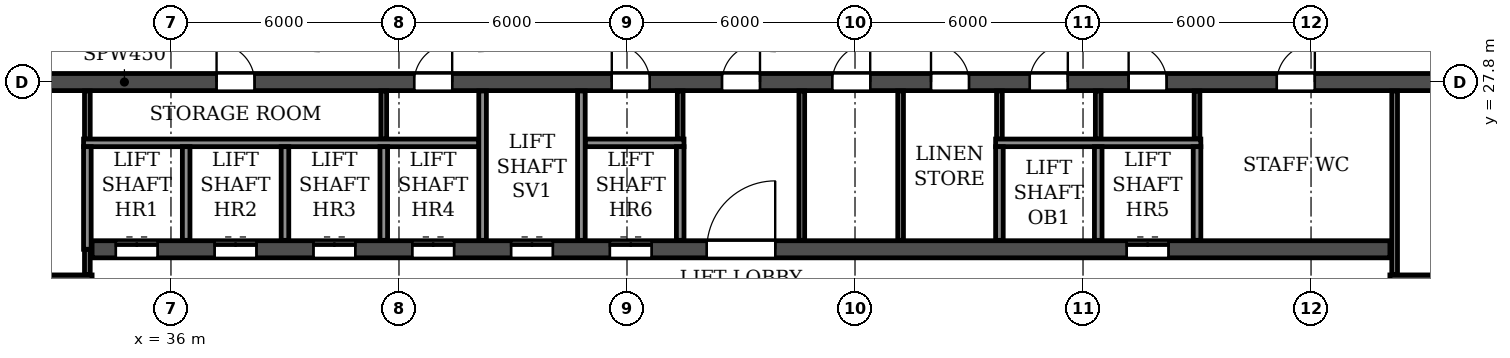
"""IFC4 building model, lengths in metres.
Left out: names, types, materials, properties, quantities, classifications, styles, units other than length and angle.
Written with IfcOpenShell. Run it as: python <this file> out.ifc"""

import sys

from ifc_helpers import new_model, si_unit, direction, frame, frame_2d, origin, place, context, subcontext, project, spatial, rectangle, extrude, element, fill, save


model = new_model("IFC4")
c1 = context("Model", 3, precision=1e-05, world=origin(), true_north=direction((0.0, 1.0)))
c2 = subcontext(c1, "Body", "Model", "MODEL_VIEW")
j1 = project(units=[si_unit("LENGTHUNIT", "METRE"), si_unit("PLANEANGLEUNIT", "RADIAN")], contexts=[c1])
p1 = place(None, origin())
s1 = spatial("IfcSite", under=j1, at=p1, CompositionType="ELEMENT")
p2 = place(p1, origin())
s2 = spatial("IfcBuilding", under=s1, at=p2, CompositionType="ELEMENT")
p3 = place(p2, frame((0.0, 0.0, 158.7)))
s3 = spatial("IfcBuildingStorey", under=s2, at=p3, CompositionType="ELEMENT", Elevation=158.7)
p4 = place(p3, frame((18.2, 27.8, 0.0), z_axis=(0.0, 0.0, 1.0), x_axis=(1.0, 0.0, 0.0)))
e1 = element("IfcWall", 1, at=p4, inside=s3, PredefinedType="SOLIDWALL", context=c2, shape_type="SweptSolid", body=[
    extrude(rectangle(XDim=65.6, YDim=0.45, at=frame_2d((32.8, 0.0))), origin(), (0.0, 0.0, 1.0), 3.07),
])
p5 = place(p4, frame((0.7, 0.0, 0.0)))
e2 = element("IfcOpeningElement", 2, at=p5, cuts=e1, PredefinedType="OPENING", context=c2, shape_type="SweptSolid", body=[
    extrude(rectangle(XDim=1.0, YDim=2.1, at=frame_2d((0.5, 1.05))), frame((0.0, 0.235, 0.0), z_axis=(0.0, -1.0, 0.0), x_axis=(1.0, 0.0, 0.0)), (0.0, 0.0, 1.0), 0.47),
])
p6 = place(p4, frame((4.05, 0.0, 0.0)))
e3 = element("IfcOpeningElement", 3, at=p6, cuts=e1, PredefinedType="OPENING", context=c2, shape_type="SweptSolid", body=[
    extrude(rectangle(XDim=0.9, YDim=2.1, at=frame_2d((0.45, 1.05))), frame((0.0, 0.235, 0.0), z_axis=(0.0, -1.0, 0.0), x_axis=(1.0, 0.0, 0.0)), (0.0, 0.0, 1.0), 0.47),
])
p7 = place(p4, frame((8.65, 0.0, 0.0)))
e4 = element("IfcOpeningElement", 4, at=p7, cuts=e1, PredefinedType="OPENING", context=c2, shape_type="SweptSolid", body=[
    extrude(rectangle(XDim=0.9, YDim=2.1, at=frame_2d((0.45, 1.05))), frame((0.0, 0.235, 0.0), z_axis=(0.0, -1.0, 0.0), x_axis=(1.0, 0.0, 0.0)), (0.0, 0.0, 1.0), 0.47),
])
p8 = place(p4, frame((13.25, 0.0, 0.0)))
e5 = element("IfcOpeningElement", 5, at=p8, cuts=e1, PredefinedType="OPENING", context=c2, shape_type="SweptSolid", body=[
    extrude(rectangle(XDim=0.9, YDim=2.1, at=frame_2d((0.45, 1.05))), frame((0.0, 0.235, 0.0), z_axis=(0.0, -1.0, 0.0), x_axis=(1.0, 0.0, 0.0)), (0.0, 0.0, 1.0), 0.47),
])
p9 = place(p4, frame((19.0, 0.0, 0.0)))
e6 = element("IfcOpeningElement", 6, at=p9, cuts=e1, PredefinedType="OPENING", context=c2, shape_type="SweptSolid", body=[
    extrude(rectangle(XDim=1.0, YDim=2.1, at=frame_2d((0.5, 1.05))), frame((0.0, 0.235, 0.0), z_axis=(0.0, -1.0, 0.0), x_axis=(1.0, 0.0, 0.0)), (0.0, 0.0, 1.0), 0.47),
])
p10 = place(p4, frame((24.2, 0.0, 0.0)))
e7 = element("IfcOpeningElement", 7, at=p10, cuts=e1, PredefinedType="OPENING", context=c2, shape_type="SweptSolid", body=[
    extrude(rectangle(XDim=1.0, YDim=2.1, at=frame_2d((0.5, 1.05))), frame((0.0, 0.235, 0.0), z_axis=(0.0, -1.0, 0.0), x_axis=(1.0, 0.0, 0.0)), (0.0, 0.0, 1.0), 0.47),
])
p11 = place(p4, frame((29.4, 0.0, 0.0)))
e8 = element("IfcOpeningElement", 8, at=p11, cuts=e1, PredefinedType="OPENING", context=c2, shape_type="SweptSolid", body=[
    extrude(rectangle(XDim=1.0, YDim=2.1, at=frame_2d((0.5, 1.05))), frame((0.0, 0.235, 0.0), z_axis=(0.0, -1.0, 0.0), x_axis=(1.0, 0.0, 0.0)), (0.0, 0.0, 1.0), 0.47),
])
p12 = place(p4, frame((32.3, 0.0, 0.0)))
e9 = element("IfcOpeningElement", 9, at=p12, cuts=e1, PredefinedType="OPENING", context=c2, shape_type="SweptSolid", body=[
    extrude(rectangle(XDim=1.0, YDim=2.1, at=frame_2d((0.5, 1.05))), frame((0.0, 0.235, 0.0), z_axis=(0.0, -1.0, 0.0), x_axis=(1.0, 0.0, 0.0)), (0.0, 0.0, 1.0), 0.47),
])
p13 = place(p4, frame((35.2, 0.0, 0.0)))
e10 = element("IfcOpeningElement", 10, at=p13, cuts=e1, PredefinedType="OPENING", context=c2, shape_type="SweptSolid", body=[
    extrude(rectangle(XDim=1.0, YDim=2.1, at=frame_2d((0.5, 1.05))), frame((0.0, 0.235, 0.0), z_axis=(0.0, -1.0, 0.0), x_axis=(1.0, 0.0, 0.0)), (0.0, 0.0, 1.0), 0.47),
])
p14 = place(p4, frame((37.8, 0.0, 0.0)))
e11 = element("IfcOpeningElement", 11, at=p14, cuts=e1, PredefinedType="OPENING", context=c2, shape_type="SweptSolid", body=[
    extrude(rectangle(XDim=1.0, YDim=2.1, at=frame_2d((0.5, 1.05))), frame((0.0, 0.235, 0.0), z_axis=(0.0, -1.0, 0.0), x_axis=(1.0, 0.0, 0.0)), (0.0, 0.0, 1.0), 0.47),
])
p15 = place(p4, frame((40.4, 0.0, 0.0)))
e12 = element("IfcOpeningElement", 12, at=p15, cuts=e1, PredefinedType="OPENING", context=c2, shape_type="SweptSolid", body=[
    extrude(rectangle(XDim=1.0, YDim=2.1, at=frame_2d((0.5, 1.05))), frame((0.0, 0.235, 0.0), z_axis=(0.0, -1.0, 0.0), x_axis=(1.0, 0.0, 0.0)), (0.0, 0.0, 1.0), 0.47),
])
p16 = place(p4, frame((43.0, 0.0, 0.0)))
e13 = element("IfcOpeningElement", 13, at=p16, cuts=e1, PredefinedType="OPENING", context=c2, shape_type="SweptSolid", body=[
    extrude(rectangle(XDim=1.0, YDim=2.1, at=frame_2d((0.5, 1.05))), frame((0.0, 0.235, 0.0), z_axis=(0.0, -1.0, 0.0), x_axis=(1.0, 0.0, 0.0)), (0.0, 0.0, 1.0), 0.47),
])
p17 = place(p4, frame((46.9, 0.0, 0.0)))
e14 = element("IfcOpeningElement", 14, at=p17, cuts=e1, PredefinedType="OPENING", context=c2, shape_type="SweptSolid", body=[
    extrude(rectangle(XDim=1.0, YDim=2.1, at=frame_2d((0.5, 1.05))), frame((0.0, 0.235, 0.0), z_axis=(0.0, -1.0, 0.0), x_axis=(1.0, 0.0, 0.0)), (0.0, 0.0, 1.0), 0.47),
])
p18 = place(p4, frame((51.45, 0.0, 0.0)))
e15 = element("IfcOpeningElement", 15, at=p18, cuts=e1, PredefinedType="OPENING", context=c2, shape_type="SweptSolid", body=[
    extrude(rectangle(XDim=0.9, YDim=2.1, at=frame_2d((0.45, 1.05))), frame((0.0, 0.235, 0.0), z_axis=(0.0, -1.0, 0.0), x_axis=(1.0, 0.0, 0.0)), (0.0, 0.0, 1.0), 0.47),
])
p19 = place(p4, frame((56.05, 0.0, 0.0)))
e16 = element("IfcOpeningElement", 16, at=p19, cuts=e1, PredefinedType="OPENING", context=c2, shape_type="SweptSolid", body=[
    extrude(rectangle(XDim=0.9, YDim=2.1, at=frame_2d((0.45, 1.05))), frame((0.0, 0.235, 0.0), z_axis=(0.0, -1.0, 0.0), x_axis=(1.0, 0.0, 0.0)), (0.0, 0.0, 1.0), 0.47),
])
p20 = place(p4, frame((60.65, 0.0, 0.0)))
e17 = element("IfcOpeningElement", 17, at=p20, cuts=e1, PredefinedType="OPENING", context=c2, shape_type="SweptSolid", body=[
    extrude(rectangle(XDim=0.9, YDim=2.1, at=frame_2d((0.45, 1.05))), frame((0.0, 0.235, 0.0), z_axis=(0.0, -1.0, 0.0), x_axis=(1.0, 0.0, 0.0)), (0.0, 0.0, 1.0), 0.47),
])
p21 = place(p4, frame((63.9, 0.0, 0.0)))
e18 = element("IfcOpeningElement", 18, at=p21, cuts=e1, PredefinedType="OPENING", context=c2, shape_type="SweptSolid", body=[
    extrude(rectangle(XDim=1.0, YDim=2.1, at=frame_2d((0.5, 1.05))), frame((0.0, 0.235, 0.0), z_axis=(0.0, -1.0, 0.0), x_axis=(1.0, 0.0, 0.0)), (0.0, 0.0, 1.0), 0.47),
])
p22 = place(p3, frame((33.925, 23.4, 0.0), z_axis=(0.0, 0.0, 1.0), x_axis=(1.0, 0.0, 0.0)))
e19 = element("IfcWall", 19, at=p22, inside=s3, PredefinedType="SOLIDWALL", context=c2, shape_type="SweptSolid", body=[
    extrude(rectangle(XDim=34.15, YDim=0.45, at=frame_2d((17.075, 0.0))), origin(), (0.0, 0.0, 1.0), 3.07),
])
p23 = place(p22, frame((16.175, 0.0, 0.0)))
e20 = element("IfcOpeningElement", 20, at=p23, cuts=e19, PredefinedType="OPENING", context=c2, shape_type="SweptSolid", body=[
    extrude(rectangle(XDim=1.8, YDim=2.1, at=frame_2d((0.9, 1.05))), frame((0.0, 0.235, 0.0), z_axis=(0.0, -1.0, 0.0), x_axis=(1.0, 0.0, 0.0)), (0.0, 0.0, 1.0), 0.47),
])
p24 = place(p22, frame((0.625, 0.0, 0.0)))
e21 = element("IfcOpeningElement", 21, at=p24, cuts=e19, PredefinedType="OPENING", context=c2, shape_type="SweptSolid", body=[
    extrude(rectangle(XDim=1.1, YDim=2.1, at=frame_2d((0.55, 1.05))), frame((0.0, 0.235, 0.0), z_axis=(0.0, -1.0, 0.0), x_axis=(1.0, 0.0, 0.0)), (0.0, 0.0, 1.0), 0.47),
])
p25 = place(p22, frame((3.225, 0.0, 0.0)))
e22 = element("IfcOpeningElement", 22, at=p25, cuts=e19, PredefinedType="OPENING", context=c2, shape_type="SweptSolid", body=[
    extrude(rectangle(XDim=1.1, YDim=2.1, at=frame_2d((0.55, 1.05))), frame((0.0, 0.235, 0.0), z_axis=(0.0, -1.0, 0.0), x_axis=(1.0, 0.0, 0.0)), (0.0, 0.0, 1.0), 0.47),
])
p26 = place(p22, frame((5.825, 0.0, 0.0)))
e23 = element("IfcOpeningElement", 23, at=p26, cuts=e19, PredefinedType="OPENING", context=c2, shape_type="SweptSolid", body=[
    extrude(rectangle(XDim=1.1, YDim=2.1, at=frame_2d((0.55, 1.05))), frame((0.0, 0.235, 0.0), z_axis=(0.0, -1.0, 0.0), x_axis=(1.0, 0.0, 0.0)), (0.0, 0.0, 1.0), 0.47),
])
p27 = place(p22, frame((8.425, 0.0, 0.0)))
e24 = element("IfcOpeningElement", 24, at=p27, cuts=e19, PredefinedType="OPENING", context=c2, shape_type="SweptSolid", body=[
    extrude(rectangle(XDim=1.1, YDim=2.1, at=frame_2d((0.55, 1.05))), frame((0.0, 0.235, 0.0), z_axis=(0.0, -1.0, 0.0), x_axis=(1.0, 0.0, 0.0)), (0.0, 0.0, 1.0), 0.47),
])
p28 = place(p22, frame((11.025, 0.0, 0.0)))
e25 = element("IfcOpeningElement", 25, at=p28, cuts=e19, PredefinedType="OPENING", context=c2, shape_type="SweptSolid", body=[
    extrude(rectangle(XDim=1.1, YDim=2.1, at=frame_2d((0.55, 1.05))), frame((0.0, 0.235, 0.0), z_axis=(0.0, -1.0, 0.0), x_axis=(1.0, 0.0, 0.0)), (0.0, 0.0, 1.0), 0.47),
])
p29 = place(p22, frame((13.625, 0.0, 0.0)))
e26 = element("IfcOpeningElement", 26, at=p29, cuts=e19, PredefinedType="OPENING", context=c2, shape_type="SweptSolid", body=[
    extrude(rectangle(XDim=1.1, YDim=2.1, at=frame_2d((0.55, 1.05))), frame((0.0, 0.235, 0.0), z_axis=(0.0, -1.0, 0.0), x_axis=(1.0, 0.0, 0.0)), (0.0, 0.0, 1.0), 0.47),
])
p30 = place(p22, frame((27.225, 0.0, 0.0)))
e27 = element("IfcOpeningElement", 27, at=p30, cuts=e19, PredefinedType="OPENING", context=c2, shape_type="SweptSolid", body=[
    extrude(rectangle(XDim=1.1, YDim=2.1, at=frame_2d((0.55, 1.05))), frame((0.0, 0.235, 0.0), z_axis=(0.0, -1.0, 0.0), x_axis=(1.0, 0.0, 0.0)), (0.0, 0.0, 1.0), 0.47),
])
for number, where, z_axis, x_axis in (
    (28, (29.875, 22.6, 0.0), (0.0, 0.0, 1.0), (1.0, 0.0, 0.0)),
    (29, (68.075, 22.6, 0.0), (0.0, 0.0, 1.0), (1.0, 0.0, 0.0)),
):
    element("IfcWall", number, at=place(p3, frame(where, z_axis=z_axis, x_axis=x_axis)), inside=s3, PredefinedType="SOLIDWALL", context=c2, shape_type="SweptSolid", body=[
        extrude(rectangle(XDim=4.05, YDim=0.25, at=frame_2d((2.025, 0.0))), origin(), (0.0, 0.0, 1.0), 3.07),
    ])
p31 = place(p3, frame((49.4, 26.3, 0.0), z_axis=(0.0, 0.0, 1.0), x_axis=(0.0, 1.0, 0.0)))
e30 = element("IfcWall", 30, at=p31, inside=s3, PredefinedType="PARTITIONING", context=c2, shape_type="SweptSolid", body=[
    extrude(rectangle(XDim=1.265, YDim=0.15, at=frame_2d((0.632, 0.0))), origin(), (0.0, 0.0, 1.0), 3.07),
])
p32 = place(p3, frame((52.6, 23.635, 0.0), z_axis=(0.0, 0.0, 1.0), x_axis=(0.0, 1.0, 0.0)))
e31 = element("IfcWall", 31, at=p32, inside=s3, PredefinedType="PARTITIONING", context=c2, shape_type="SweptSolid", body=[
    extrude(rectangle(XDim=3.93, YDim=0.15, at=frame_2d((1.965, 0.0))), origin(), (0.0, 0.0, 1.0), 3.07),
])
p33 = place(p3, frame((41.6, 26.3, 0.0), z_axis=(0.0, 0.0, 1.0), x_axis=(0.0, 1.0, 0.0)))
e32 = element("IfcWall", 32, at=p33, inside=s3, PredefinedType="PARTITIONING", context=c2, shape_type="SweptSolid", body=[
    extrude(rectangle(XDim=1.265, YDim=0.15, at=frame_2d((0.632, 0.0))), origin(), (0.0, 0.0, 1.0), 3.07),
])
p34 = place(p3, frame((55.2, 23.635, 0.0), z_axis=(0.0, 0.0, 1.0), x_axis=(0.0, 1.0, 0.0)))
e33 = element("IfcWall", 33, at=p34, inside=s3, PredefinedType="PARTITIONING", context=c2, shape_type="SweptSolid", body=[
    extrude(rectangle(XDim=3.93, YDim=0.15, at=frame_2d((1.965, 0.0))), origin(), (0.0, 0.0, 1.0), 3.07),
])
for number, where, z_axis, x_axis in (
    (34, (57.8, 26.3, 0.0), (0.0, 0.0, 1.0), (0.0, 1.0, 0.0)),
    (35, (60.4, 26.3, 0.0), (0.0, 0.0, 1.0), (0.0, 1.0, 0.0)),
    (36, (63.0, 26.3, 0.0), (0.0, 0.0, 1.0), (0.0, 1.0, 0.0)),
):
    element("IfcWall", number, at=place(p3, frame(where, z_axis=z_axis, x_axis=x_axis)), inside=s3, PredefinedType="PARTITIONING", context=c2, shape_type="SweptSolid", body=[
        extrude(rectangle(XDim=1.265, YDim=0.15, at=frame_2d((0.632, 0.0))), origin(), (0.0, 0.0, 1.0), 3.07),
    ])
p35 = place(p3, frame((33.8, 22.735, 0.0), z_axis=(0.0, 0.0, 1.0), x_axis=(0.0, 1.0, 0.0)))
e37 = element("IfcWall", 37, at=p35, inside=s3, PredefinedType="PARTITIONING", context=c2, shape_type="SweptSolid", body=[
    extrude(rectangle(XDim=0.665, YDim=0.15, at=frame_2d((0.333, 0.0))), origin(), (0.0, 0.0, 1.0), 3.07),
])
p36 = place(p3, frame((33.8, 26.3, 0.0), z_axis=(0.0, 0.0, 1.0), x_axis=(0.0, 1.0, 0.0)))
e38 = element("IfcWall", 38, at=p36, inside=s3, PredefinedType="PARTITIONING", context=c2, shape_type="SweptSolid", body=[
    extrude(rectangle(XDim=1.265, YDim=0.15, at=frame_2d((0.632, 0.0))), origin(), (0.0, 0.0, 1.0), 3.07),
])
p37 = place(p3, frame((68.2, 22.735, 0.0), z_axis=(0.0, 0.0, 1.0), x_axis=(0.0, 1.0, 0.0)))
e39 = element("IfcWall", 39, at=p37, inside=s3, PredefinedType="PARTITIONING", context=c2, shape_type="SweptSolid", body=[
    extrude(rectangle(XDim=4.83, YDim=0.15, at=frame_2d((2.415, 0.0))), origin(), (0.0, 0.0, 1.0), 3.07),
])
p38 = place(p3, frame((33.7, 26.2, 0.0), z_axis=(0.0, 0.0, 1.0), x_axis=(1.0, 0.0, 0.0)))
e40 = element("IfcWall", 40, at=p38, inside=s3, PredefinedType="PARTITIONING", context=c2, shape_type="SweptSolid", body=[
    extrude(rectangle(XDim=10.4, YDim=0.2, at=frame_2d((5.2, 0.0))), origin(), (0.0, 0.0, 1.0), 3.07),
])
p39 = place(p3, frame((46.9, 26.2, 0.0), z_axis=(0.0, 0.0, 1.0), x_axis=(1.0, 0.0, 0.0)))
e41 = element("IfcWall", 41, at=p39, inside=s3, PredefinedType="PARTITIONING", context=c2, shape_type="SweptSolid", body=[
    extrude(rectangle(XDim=2.6, YDim=0.2, at=frame_2d((1.3, 0.0))), origin(), (0.0, 0.0, 1.0), 3.07),
])
p40 = place(p3, frame((57.7, 26.2, 0.0), z_axis=(0.0, 0.0, 1.0), x_axis=(1.0, 0.0, 0.0)))
e42 = element("IfcWall", 42, at=p40, inside=s3, PredefinedType="PARTITIONING", context=c2, shape_type="SweptSolid", body=[
    extrude(rectangle(XDim=5.4, YDim=0.2, at=frame_2d((2.7, 0.0))), origin(), (0.0, 0.0, 1.0), 3.07),
])
p41 = place(p3, frame((33.8, 23.4, 0.0), z_axis=(0.0, 0.0, 1.0), x_axis=(0.0, 1.0, 0.0)))
e43 = element("IfcWall", 43, at=p41, inside=s3, PredefinedType="PARTITIONING", context=c2, shape_type="SweptSolid", body=[
    extrude(rectangle(XDim=2.7, YDim=0.2, at=frame_2d((1.35, 0.0))), origin(), (0.0, 0.0, 1.0), 3.07),
])
for number, where, z_axis, x_axis in (
    (44, (36.4, 23.635, 0.0), (0.0, 0.0, 1.0), (0.0, 1.0, 0.0)),
    (45, (39.0, 23.635, 0.0), (0.0, 0.0, 1.0), (0.0, 1.0, 0.0)),
    (46, (41.6, 23.635, 0.0), (0.0, 0.0, 1.0), (0.0, 1.0, 0.0)),
):
    element("IfcWall", number, at=place(p3, frame(where, z_axis=z_axis, x_axis=x_axis)), inside=s3, PredefinedType="PARTITIONING", context=c2, shape_type="SweptSolid", body=[
        extrude(rectangle(XDim=2.465, YDim=0.2, at=frame_2d((1.232, 0.0))), origin(), (0.0, 0.0, 1.0), 3.07),
    ])
for number, where, z_axis, x_axis in (
    (47, (44.2, 23.635, 0.0), (0.0, 0.0, 1.0), (0.0, 1.0, 0.0)),
    (48, (46.8, 23.635, 0.0), (0.0, 0.0, 1.0), (0.0, 1.0, 0.0)),
):
    element("IfcWall", number, at=place(p3, frame(where, z_axis=z_axis, x_axis=x_axis)), inside=s3, PredefinedType="PARTITIONING", context=c2, shape_type="SweptSolid", body=[
        extrude(rectangle(XDim=3.93, YDim=0.2, at=frame_2d((1.965, 0.0))), origin(), (0.0, 0.0, 1.0), 3.07),
    ])
for number, where, z_axis, x_axis in (
    (49, (49.4, 23.635, 0.0), (0.0, 0.0, 1.0), (0.0, 1.0, 0.0)),
    (50, (57.8, 23.635, 0.0), (0.0, 0.0, 1.0), (0.0, 1.0, 0.0)),
    (51, (60.4, 23.635, 0.0), (0.0, 0.0, 1.0), (0.0, 1.0, 0.0)),
    (52, (63.0, 23.635, 0.0), (0.0, 0.0, 1.0), (0.0, 1.0, 0.0)),
):
    element("IfcWall", number, at=place(p3, frame(where, z_axis=z_axis, x_axis=x_axis)), inside=s3, PredefinedType="PARTITIONING", context=c2, shape_type="SweptSolid", body=[
        extrude(rectangle(XDim=2.465, YDim=0.2, at=frame_2d((1.232, 0.0))), origin(), (0.0, 0.0, 1.0), 3.07),
    ])
p42 = place(p9, origin())
e53 = element("IfcDoor", 53, at=p42, inside=s3, OperationType="SINGLE_SWING_LEFT", PredefinedType="DOOR", context=c2, shape_type="SweptSolid", body=[
    extrude(rectangle(XDim=1.0, YDim=2.1, at=frame_2d((0.5, 1.05))), frame((0.0, 0.025, 0.0), z_axis=(0.0, -1.0, 0.0), x_axis=(1.0, 0.0, 0.0)), (0.0, 0.0, 1.0), 0.05),
])
fill(e6, e53)
p43 = place(p10, origin())
e54 = element("IfcDoor", 54, at=p43, inside=s3, OperationType="SINGLE_SWING_RIGHT", PredefinedType="DOOR", context=c2, shape_type="SweptSolid", body=[
    extrude(rectangle(XDim=1.0, YDim=2.1, at=frame_2d((0.5, 1.05))), frame((0.0, 0.025, 0.0), z_axis=(0.0, -1.0, 0.0), x_axis=(1.0, 0.0, 0.0)), (0.0, 0.0, 1.0), 0.05),
])
fill(e7, e54)
p44 = place(p11, origin())
e55 = element("IfcDoor", 55, at=p44, inside=s3, OperationType="SINGLE_SWING_LEFT", PredefinedType="DOOR", context=c2, shape_type="SweptSolid", body=[
    extrude(rectangle(XDim=1.0, YDim=2.1, at=frame_2d((0.5, 1.05))), frame((0.0, 0.025, 0.0), z_axis=(0.0, -1.0, 0.0), x_axis=(1.0, 0.0, 0.0)), (0.0, 0.0, 1.0), 0.05),
])
fill(e8, e55)
p45 = place(p12, origin())
e56 = element("IfcDoor", 56, at=p45, inside=s3, OperationType="SINGLE_SWING_RIGHT", PredefinedType="DOOR", context=c2, shape_type="SweptSolid", body=[
    extrude(rectangle(XDim=1.0, YDim=2.1, at=frame_2d((0.5, 1.05))), frame((0.0, 0.025, 0.0), z_axis=(0.0, -1.0, 0.0), x_axis=(1.0, 0.0, 0.0)), (0.0, 0.0, 1.0), 0.05),
])
fill(e9, e56)
p46 = place(p13, origin())
e57 = element("IfcDoor", 57, at=p46, inside=s3, OperationType="SINGLE_SWING_RIGHT", PredefinedType="DOOR", context=c2, shape_type="SweptSolid", body=[
    extrude(rectangle(XDim=1.0, YDim=2.1, at=frame_2d((0.5, 1.05))), frame((0.0, 0.025, 0.0), z_axis=(0.0, -1.0, 0.0), x_axis=(1.0, 0.0, 0.0)), (0.0, 0.0, 1.0), 0.05),
])
fill(e10, e57)
p47 = place(p14, origin())
e58 = element("IfcDoor", 58, at=p47, inside=s3, OperationType="SINGLE_SWING_LEFT", PredefinedType="DOOR", context=c2, shape_type="SweptSolid", body=[
    extrude(rectangle(XDim=1.0, YDim=2.1, at=frame_2d((0.5, 1.05))), frame((0.0, 0.025, 0.0), z_axis=(0.0, -1.0, 0.0), x_axis=(1.0, 0.0, 0.0)), (0.0, 0.0, 1.0), 0.05),
])
fill(e11, e58)
p48 = place(p15, origin())
e59 = element("IfcDoor", 59, at=p48, inside=s3, OperationType="SINGLE_SWING_RIGHT", PredefinedType="DOOR", context=c2, shape_type="SweptSolid", body=[
    extrude(rectangle(XDim=1.0, YDim=2.1, at=frame_2d((0.5, 1.05))), frame((0.0, 0.025, 0.0), z_axis=(0.0, -1.0, 0.0), x_axis=(1.0, 0.0, 0.0)), (0.0, 0.0, 1.0), 0.05),
])
fill(e12, e59)
p49 = place(p16, origin())
e60 = element("IfcDoor", 60, at=p49, inside=s3, OperationType="SINGLE_SWING_LEFT", PredefinedType="DOOR", context=c2, shape_type="SweptSolid", body=[
    extrude(rectangle(XDim=1.0, YDim=2.1, at=frame_2d((0.5, 1.05))), frame((0.0, 0.025, 0.0), z_axis=(0.0, -1.0, 0.0), x_axis=(1.0, 0.0, 0.0)), (0.0, 0.0, 1.0), 0.05),
])
fill(e13, e60)
p50 = place(p17, origin())
e61 = element("IfcDoor", 61, at=p50, inside=s3, OperationType="SINGLE_SWING_RIGHT", PredefinedType="DOOR", context=c2, shape_type="SweptSolid", body=[
    extrude(rectangle(XDim=1.0, YDim=2.1, at=frame_2d((0.5, 1.05))), frame((0.0, 0.025, 0.0), z_axis=(0.0, -1.0, 0.0), x_axis=(1.0, 0.0, 0.0)), (0.0, 0.0, 1.0), 0.05),
])
fill(e14, e61)
p51 = place(p23, origin())
e62 = element("IfcDoor", 62, at=p51, inside=s3, OperationType="DOUBLE_DOOR_SINGLE_SWING", PredefinedType="DOOR", context=c2, shape_type="SweptSolid", body=[
    extrude(rectangle(XDim=1.8, YDim=2.1, at=frame_2d((0.9, 1.05))), frame((0.0, 0.025, 0.0), z_axis=(0.0, -1.0, 0.0), x_axis=(1.0, 0.0, 0.0)), (0.0, 0.0, 1.0), 0.05),
])
fill(e20, e62)
p52 = place(p24, origin())
e63 = element("IfcDoor", 63, at=p52, inside=s3, OperationType="DOUBLE_DOOR_SLIDING", PredefinedType="DOOR", context=c2, shape_type="SweptSolid", body=[
    extrude(rectangle(XDim=1.1, YDim=2.1, at=frame_2d((0.55, 1.05))), frame((0.0, 0.025, 0.0), z_axis=(0.0, -1.0, 0.0), x_axis=(1.0, 0.0, 0.0)), (0.0, 0.0, 1.0), 0.05),
])
fill(e21, e63)
p53 = place(p25, origin())
e64 = element("IfcDoor", 64, at=p53, inside=s3, OperationType="DOUBLE_DOOR_SLIDING", PredefinedType="DOOR", context=c2, shape_type="SweptSolid", body=[
    extrude(rectangle(XDim=1.1, YDim=2.1, at=frame_2d((0.55, 1.05))), frame((0.0, 0.025, 0.0), z_axis=(0.0, -1.0, 0.0), x_axis=(1.0, 0.0, 0.0)), (0.0, 0.0, 1.0), 0.05),
])
fill(e22, e64)
p54 = place(p26, origin())
e65 = element("IfcDoor", 65, at=p54, inside=s3, OperationType="DOUBLE_DOOR_SLIDING", PredefinedType="DOOR", context=c2, shape_type="SweptSolid", body=[
    extrude(rectangle(XDim=1.1, YDim=2.1, at=frame_2d((0.55, 1.05))), frame((0.0, 0.025, 0.0), z_axis=(0.0, -1.0, 0.0), x_axis=(1.0, 0.0, 0.0)), (0.0, 0.0, 1.0), 0.05),
])
fill(e23, e65)
p55 = place(p27, origin())
e66 = element("IfcDoor", 66, at=p55, inside=s3, OperationType="DOUBLE_DOOR_SLIDING", PredefinedType="DOOR", context=c2, shape_type="SweptSolid", body=[
    extrude(rectangle(XDim=1.1, YDim=2.1, at=frame_2d((0.55, 1.05))), frame((0.0, 0.025, 0.0), z_axis=(0.0, -1.0, 0.0), x_axis=(1.0, 0.0, 0.0)), (0.0, 0.0, 1.0), 0.05),
])
fill(e24, e66)
p56 = place(p28, origin())
e67 = element("IfcDoor", 67, at=p56, inside=s3, OperationType="DOUBLE_DOOR_SLIDING", PredefinedType="DOOR", context=c2, shape_type="SweptSolid", body=[
    extrude(rectangle(XDim=1.1, YDim=2.1, at=frame_2d((0.55, 1.05))), frame((0.0, 0.025, 0.0), z_axis=(0.0, -1.0, 0.0), x_axis=(1.0, 0.0, 0.0)), (0.0, 0.0, 1.0), 0.05),
])
fill(e25, e67)
p57 = place(p29, origin())
e68 = element("IfcDoor", 68, at=p57, inside=s3, OperationType="DOUBLE_DOOR_SLIDING", PredefinedType="DOOR", context=c2, shape_type="SweptSolid", body=[
    extrude(rectangle(XDim=1.1, YDim=2.1, at=frame_2d((0.55, 1.05))), frame((0.0, 0.025, 0.0), z_axis=(0.0, -1.0, 0.0), x_axis=(1.0, 0.0, 0.0)), (0.0, 0.0, 1.0), 0.05),
])
fill(e26, e68)
p58 = place(p30, origin())
e69 = element("IfcDoor", 69, at=p58, inside=s3, OperationType="DOUBLE_DOOR_SLIDING", PredefinedType="DOOR", context=c2, shape_type="SweptSolid", body=[
    extrude(rectangle(XDim=1.1, YDim=2.1, at=frame_2d((0.55, 1.05))), frame((0.0, 0.025, 0.0), z_axis=(0.0, -1.0, 0.0), x_axis=(1.0, 0.0, 0.0)), (0.0, 0.0, 1.0), 0.05),
])
fill(e27, e69)
save(model, sys.argv[1])
